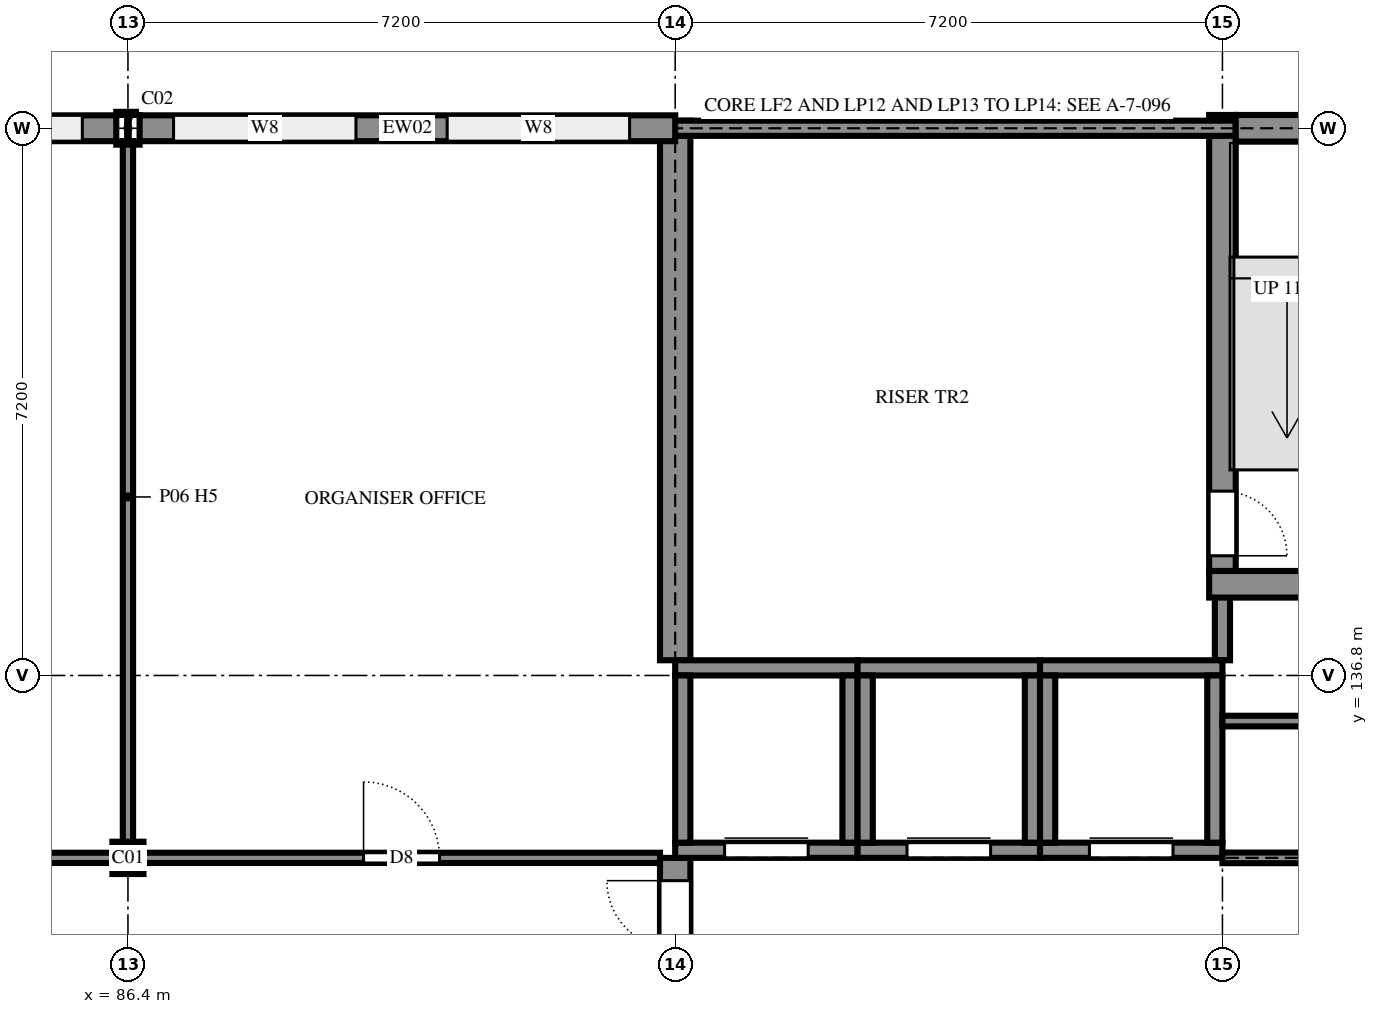
"""IFC4 building model, lengths in metres.
Left out: names, types, materials, properties, quantities, classifications, styles, units other than length and angle.
Written with IfcOpenShell. Run it as: python <this file> out.ifc"""

import sys

from ifc_helpers import new_model, si_unit, direction, frame, frame_2d, origin, origin_2d, place, context, subcontext, project, spatial, rectangle, i_section, extrude, element, fill, save


model = new_model("IFC4")
c1 = context("Model", 3, precision=1e-05, world=origin(), true_north=direction((0.0, 1.0)))
c2 = subcontext(c1, "Body", "Model", "MODEL_VIEW")
j1 = project(units=[si_unit("LENGTHUNIT", "METRE"), si_unit("PLANEANGLEUNIT", "RADIAN")], contexts=[c1])
p1 = place(None, origin())
s1 = spatial("IfcSite", under=j1, at=p1, CompositionType="ELEMENT")
p2 = place(p1, origin())
s2 = spatial("IfcBuilding", under=s1, at=p2, CompositionType="ELEMENT")
p3 = place(p2, frame((0.0, 0.0, 21.6)))
s3 = spatial("IfcBuildingStorey", under=s2, at=p3, CompositionType="ELEMENT", Elevation=21.6)
p4 = place(p3, frame((86.4, 134.4, 0.0), z_axis=(0.0, 0.0, 1.0), x_axis=(1.0, 0.0, 0.0)))
e1 = element("IfcColumn", 1, at=p4, inside=s3, PredefinedType="COLUMN", context=c2, shape_type="SweptSolid", body=[
    extrude(i_section(OverallWidth=0.409, OverallDepth=0.425, WebThickness=0.033, FlangeThickness=0.052, FilletRadius=0.015, at=origin_2d()), origin(), (0.0, 0.0, 1.0), 3.6),
])
p5 = place(p3, frame((86.4, 144.0, 0.0), z_axis=(0.0, 0.0, 1.0), x_axis=(1.0, 0.0, 0.0)))
e2 = element("IfcColumn", 2, at=p5, inside=s3, PredefinedType="COLUMN", context=c2, shape_type="SweptSolid", body=[
    extrude(i_section(OverallWidth=0.307, OverallDepth=0.432, WebThickness=0.021, FlangeThickness=0.04, FilletRadius=0.027, at=origin_2d()), origin(), (0.0, 0.0, 1.0), 3.6),
])
p6 = place(p3, frame((93.6, 132.0, 0.0), z_axis=(0.0, 0.0, 1.0), x_axis=(0.0, 1.0, 0.0)))
e3 = element("IfcWall", 3, at=p6, inside=s3, PredefinedType="SHEAR", context=c2, shape_type="SweptSolid", body=[
    extrude(rectangle(XDim=2.4, YDim=0.4, at=frame_2d((1.2, 0.0))), origin(), (0.0, 0.0, 1.0), 3.6),
])
p7 = place(p6, frame((0.3, 0.0, 0.0)))
e4 = element("IfcOpeningElement", 4, at=p7, cuts=e3, PredefinedType="OPENING", context=c2, shape_type="SweptSolid", body=[
    extrude(rectangle(XDim=1.8, YDim=2.1, at=frame_2d((0.9, 1.05))), frame((0.0, 0.21, 0.0), z_axis=(0.0, -1.0, 0.0), x_axis=(1.0, 0.0, 0.0)), (0.0, 0.0, 1.0), 0.42),
])
p8 = place(p3, frame((100.8, 137.0, 0.0), z_axis=(0.0, 0.0, 1.0), x_axis=(0.0, 1.0, 0.0)))
e5 = element("IfcWall", 5, at=p8, inside=s3, PredefinedType="SHEAR", context=c2, shape_type="SweptSolid", body=[
    extrude(rectangle(XDim=1.175, YDim=0.2, at=frame_2d((0.587, 0.0))), origin(), (0.0, 0.0, 1.0), 3.6),
])
p9 = place(p3, frame((100.625, 138.0, 0.0), z_axis=(0.0, 0.0, 1.0), x_axis=(1.0, 0.0, 0.0)))
e6 = element("IfcWall", 6, at=p9, inside=s3, PredefinedType="SHEAR", context=c2, shape_type="SweptSolid", body=[
    extrude(rectangle(XDim=3.75, YDim=0.35, at=frame_2d((1.875, 0.0))), origin(), (0.0, 0.0, 1.0), 3.6),
])
p10 = place(p9, frame((1.375, 0.0, 0.0)))
e7 = element("IfcOpeningElement", 7, at=p10, cuts=e6, PredefinedType="OPENING", context=c2, shape_type="SweptSolid", body=[
    extrude(rectangle(XDim=1.0, YDim=2.1, at=frame_2d((0.5, 1.05))), frame((0.0, 0.185, 0.0), z_axis=(0.0, -1.0, 0.0), x_axis=(1.0, 0.0, 0.0)), (0.0, 0.0, 1.0), 0.37),
])
p11 = place(p3, frame((93.6, 144.1, 0.0), z_axis=(0.0, 0.0, 1.0), x_axis=(0.0, -1.0, 0.0)))
e8 = element("IfcWall", 8, at=p11, inside=s3, PredefinedType="SHEAR", context=c2, shape_type="SweptSolid", body=[
    extrude(rectangle(XDim=7.1, YDim=0.4, at=frame_2d((3.55, 0.0))), origin(), (0.0, 0.0, 1.0), 3.6),
])
p12 = place(p3, frame((100.8, 144.175, 0.0), z_axis=(0.0, 0.0, 1.0), x_axis=(0.0, -1.0, 0.0)))
e9 = element("IfcWall", 9, at=p12, inside=s3, PredefinedType="SHEAR", context=c2, shape_type="SweptSolid", body=[
    extrude(rectangle(XDim=6.0, YDim=0.35, at=frame_2d((3.0, 0.0))), origin(), (0.0, 0.0, 1.0), 3.6),
])
p13 = place(p12, frame((4.95, 0.0, 0.0)))
e10 = element("IfcOpeningElement", 10, at=p13, cuts=e9, PredefinedType="OPENING", context=c2, shape_type="SweptSolid", body=[
    extrude(rectangle(XDim=0.85, YDim=2.1, at=frame_2d((0.425, 1.05))), frame((0.0, 0.185, 0.0), z_axis=(0.0, -1.0, 0.0), x_axis=(1.0, 0.0, 0.0)), (0.0, 0.0, 1.0), 0.37),
])
p14 = place(p3, frame((100.975, 144.0, 0.0), z_axis=(0.0, 0.0, 1.0), x_axis=(-1.0, 0.0, 0.0)))
e11 = element("IfcWall", 11, at=p14, inside=s3, PredefinedType="SHEAR", context=c2, shape_type="SweptSolid", body=[
    extrude(rectangle(XDim=7.575, YDim=0.2, at=frame_2d((3.788, 0.0))), origin(), (0.0, 0.0, 1.0), 3.6),
])
p15 = place(p3, frame((104.2, 144.0, 0.0), z_axis=(0.0, 0.0, 1.0), x_axis=(-1.0, 0.0, 0.0)))
e12 = element("IfcWall", 12, at=p15, inside=s3, PredefinedType="SHEAR", context=c2, shape_type="SweptSolid", body=[
    extrude(rectangle(XDim=3.225, YDim=0.35, at=frame_2d((1.612, 0.0))), origin(), (0.0, 0.0, 1.0), 3.6),
])
p16 = place(p15, frame((1.25, 0.0, 0.6)))
e13 = element("IfcOpeningElement", 13, at=p16, cuts=e12, PredefinedType="OPENING", context=c2, shape_type="SweptSolid", body=[
    extrude(rectangle(XDim=0.9, YDim=2.1, at=frame_2d((0.45, 1.05))), frame((0.0, 0.185, 0.0), z_axis=(0.0, -1.0, 0.0), x_axis=(1.0, 0.0, 0.0)), (0.0, 0.0, 1.0), 0.37),
])
p17 = place(p3, frame((93.6, 144.0, 0.0), z_axis=(0.0, 0.0, 1.0), x_axis=(-1.0, 0.0, 0.0)))
e14 = element("IfcWall", 14, at=p17, inside=s3, PredefinedType="SOLIDWALL", context=c2, shape_type="SweptSolid", body=[
    extrude(rectangle(XDim=7.047, YDim=0.34, at=frame_2d((3.523, 0.0))), origin(), (0.0, 0.0, 1.0), 3.16),
])
p18 = place(p17, frame((4.2, 0.0, 0.9)))
e15 = element("IfcOpeningElement", 15, at=p18, cuts=e14, PredefinedType="OPENING", context=c2, shape_type="SweptSolid", body=[
    extrude(rectangle(XDim=2.4, YDim=1.8, at=frame_2d((1.2, 0.9))), frame((0.0, 0.18, 0.0), z_axis=(0.0, -1.0, 0.0), x_axis=(1.0, 0.0, 0.0)), (0.0, 0.0, 1.0), 0.36),
])
p19 = place(p17, frame((0.6, 0.0, 0.9)))
e16 = element("IfcOpeningElement", 16, at=p19, cuts=e14, PredefinedType="OPENING", context=c2, shape_type="SweptSolid", body=[
    extrude(rectangle(XDim=2.4, YDim=1.8, at=frame_2d((1.2, 0.9))), frame((0.0, 0.18, 0.0), z_axis=(0.0, -1.0, 0.0), x_axis=(1.0, 0.0, 0.0)), (0.0, 0.0, 1.0), 0.36),
])
p20 = place(p3, frame((86.247, 144.0, 0.0), z_axis=(0.0, 0.0, 1.0), x_axis=(-1.0, 0.0, 0.0)))
e17 = element("IfcWall", 17, at=p20, inside=s3, PredefinedType="SOLIDWALL", context=c2, shape_type="SweptSolid", body=[
    extrude(rectangle(XDim=6.893, YDim=0.34, at=frame_2d((3.447, 0.0))), origin(), (0.0, 0.0, 1.0), 3.16),
])
p21 = place(p20, frame((4.046, 0.0, 0.9)))
e18 = element("IfcOpeningElement", 18, at=p21, cuts=e17, PredefinedType="OPENING", context=c2, shape_type="SweptSolid", body=[
    extrude(rectangle(XDim=2.4, YDim=1.8, at=frame_2d((1.2, 0.9))), frame((0.0, 0.18, 0.0), z_axis=(0.0, -1.0, 0.0), x_axis=(1.0, 0.0, 0.0)), (0.0, 0.0, 1.0), 0.36),
])
p22 = place(p20, frame((0.447, 0.0, 0.9)))
e19 = element("IfcOpeningElement", 19, at=p22, cuts=e17, PredefinedType="OPENING", context=c2, shape_type="SweptSolid", body=[
    extrude(rectangle(XDim=2.4, YDim=1.8, at=frame_2d((1.2, 0.9))), frame((0.0, 0.18, 0.0), z_axis=(0.0, -1.0, 0.0), x_axis=(1.0, 0.0, 0.0)), (0.0, 0.0, 1.0), 0.36),
])
p23 = place(p3, frame((93.6, 134.5, 0.0), z_axis=(0.0, 0.0, 1.0), x_axis=(1.0, 0.0, 0.0)))
e20 = element("IfcWall", 20, at=p23, inside=s3, PredefinedType="SHEAR", context=c2, shape_type="SweptSolid", body=[
    extrude(rectangle(XDim=2.4, YDim=0.2, at=frame_2d((1.2, 0.0))), origin(), (0.0, 0.0, 1.0), 3.6),
])
p24 = place(p23, frame((0.65, 0.0, 0.0)))
e21 = element("IfcOpeningElement", 21, at=p24, cuts=e20, PredefinedType="OPENING", context=c2, shape_type="SweptSolid", body=[
    extrude(rectangle(XDim=1.1, YDim=2.1, at=frame_2d((0.55, 1.05))), frame((0.0, 0.11, 0.0), z_axis=(0.0, -1.0, 0.0), x_axis=(1.0, 0.0, 0.0)), (0.0, 0.0, 1.0), 0.22),
])
p25 = place(p3, frame((93.6, 136.9, 0.0), z_axis=(0.0, 0.0, 1.0), x_axis=(1.0, 0.0, 0.0)))
e22 = element("IfcWall", 22, at=p25, inside=s3, PredefinedType="SHEAR", context=c2, shape_type="SweptSolid", body=[
    extrude(rectangle(XDim=2.4, YDim=0.2, at=frame_2d((1.2, 0.0))), origin(), (0.0, 0.0, 1.0), 3.6),
])
for number, where, z_axis, x_axis in (
    (23, (93.7, 134.6, 0.0), (0.0, 0.0, 1.0), (0.0, 1.0, 0.0)),
    (24, (95.9, 134.6, 0.0), (0.0, 0.0, 1.0), (0.0, 1.0, 0.0)),
):
    element("IfcWall", number, at=place(p3, frame(where, z_axis=z_axis, x_axis=x_axis)), inside=s3, PredefinedType="SHEAR", context=c2, shape_type="SweptSolid", body=[
        extrude(rectangle(XDim=2.2, YDim=0.2, at=frame_2d((1.1, 0.0))), origin(), (0.0, 0.0, 1.0), 3.6),
    ])
p26 = place(p3, frame((96.0, 134.5, 0.0), z_axis=(0.0, 0.0, 1.0), x_axis=(1.0, 0.0, 0.0)))
e25 = element("IfcWall", 25, at=p26, inside=s3, PredefinedType="SHEAR", context=c2, shape_type="SweptSolid", body=[
    extrude(rectangle(XDim=2.4, YDim=0.2, at=frame_2d((1.2, 0.0))), origin(), (0.0, 0.0, 1.0), 3.6),
])
p27 = place(p26, frame((0.65, 0.0, 0.0)))
e26 = element("IfcOpeningElement", 26, at=p27, cuts=e25, PredefinedType="OPENING", context=c2, shape_type="SweptSolid", body=[
    extrude(rectangle(XDim=1.1, YDim=2.1, at=frame_2d((0.55, 1.05))), frame((0.0, 0.11, 0.0), z_axis=(0.0, -1.0, 0.0), x_axis=(1.0, 0.0, 0.0)), (0.0, 0.0, 1.0), 0.22),
])
p28 = place(p3, frame((96.0, 136.9, 0.0), z_axis=(0.0, 0.0, 1.0), x_axis=(1.0, 0.0, 0.0)))
e27 = element("IfcWall", 27, at=p28, inside=s3, PredefinedType="SHEAR", context=c2, shape_type="SweptSolid", body=[
    extrude(rectangle(XDim=2.4, YDim=0.2, at=frame_2d((1.2, 0.0))), origin(), (0.0, 0.0, 1.0), 3.6),
])
for number, where, z_axis, x_axis in (
    (28, (96.1, 134.6, 0.0), (0.0, 0.0, 1.0), (0.0, 1.0, 0.0)),
    (29, (98.3, 134.6, 0.0), (0.0, 0.0, 1.0), (0.0, 1.0, 0.0)),
):
    element("IfcWall", number, at=place(p3, frame(where, z_axis=z_axis, x_axis=x_axis)), inside=s3, PredefinedType="SHEAR", context=c2, shape_type="SweptSolid", body=[
        extrude(rectangle(XDim=2.2, YDim=0.2, at=frame_2d((1.1, 0.0))), origin(), (0.0, 0.0, 1.0), 3.6),
    ])
p29 = place(p3, frame((98.4, 134.5, 0.0), z_axis=(0.0, 0.0, 1.0), x_axis=(1.0, 0.0, 0.0)))
e30 = element("IfcWall", 30, at=p29, inside=s3, PredefinedType="SHEAR", context=c2, shape_type="SweptSolid", body=[
    extrude(rectangle(XDim=2.4, YDim=0.2, at=frame_2d((1.2, 0.0))), origin(), (0.0, 0.0, 1.0), 3.6),
])
p30 = place(p29, frame((0.65, 0.0, 0.0)))
e31 = element("IfcOpeningElement", 31, at=p30, cuts=e30, PredefinedType="OPENING", context=c2, shape_type="SweptSolid", body=[
    extrude(rectangle(XDim=1.1, YDim=2.1, at=frame_2d((0.55, 1.05))), frame((0.0, 0.11, 0.0), z_axis=(0.0, -1.0, 0.0), x_axis=(1.0, 0.0, 0.0)), (0.0, 0.0, 1.0), 0.22),
])
p31 = place(p3, frame((98.4, 136.9, 0.0), z_axis=(0.0, 0.0, 1.0), x_axis=(1.0, 0.0, 0.0)))
e32 = element("IfcWall", 32, at=p31, inside=s3, PredefinedType="SHEAR", context=c2, shape_type="SweptSolid", body=[
    extrude(rectangle(XDim=2.4, YDim=0.2, at=frame_2d((1.2, 0.0))), origin(), (0.0, 0.0, 1.0), 3.6),
])
for number, where, z_axis, x_axis in (
    (33, (98.5, 134.6, 0.0), (0.0, 0.0, 1.0), (0.0, 1.0, 0.0)),
    (34, (100.7, 134.6, 0.0), (0.0, 0.0, 1.0), (0.0, 1.0, 0.0)),
):
    element("IfcWall", number, at=place(p3, frame(where, z_axis=z_axis, x_axis=x_axis)), inside=s3, PredefinedType="SHEAR", context=c2, shape_type="SweptSolid", body=[
        extrude(rectangle(XDim=2.2, YDim=0.2, at=frame_2d((1.1, 0.0))), origin(), (0.0, 0.0, 1.0), 3.6),
    ])
p32 = place(p3, frame((74.143, 134.4, 0.0), z_axis=(0.0, 0.0, 1.0), x_axis=(1.0, 0.0, 0.0)))
e35 = element("IfcWall", 35, at=p32, inside=s3, PredefinedType="PARTITIONING", context=c2, shape_type="SweptSolid", body=[
    extrude(rectangle(XDim=19.257, YDim=0.135, at=frame_2d((9.629, 0.0))), origin(), (0.0, 0.0, 1.0), 3.16),
])
p33 = place(p32, frame((2.758, 0.0, 0.0)))
e36 = element("IfcOpeningElement", 36, at=p33, cuts=e35, PredefinedType="OPENING", context=c2, shape_type="SweptSolid", body=[
    extrude(rectangle(XDim=1.0, YDim=2.4, at=frame_2d((0.5, 1.2))), frame((0.0, 0.077, 0.0), z_axis=(0.0, -1.0, 0.0), x_axis=(1.0, 0.0, 0.0)), (0.0, 0.0, 1.0), 0.155),
])
p34 = place(p32, frame((15.357, 0.0, 0.0)))
e37 = element("IfcOpeningElement", 37, at=p34, cuts=e35, PredefinedType="OPENING", context=c2, shape_type="SweptSolid", body=[
    extrude(rectangle(XDim=1.0, YDim=2.4, at=frame_2d((0.5, 1.2))), frame((0.0, 0.077, 0.0), z_axis=(0.0, -1.0, 0.0), x_axis=(1.0, 0.0, 0.0)), (0.0, 0.0, 1.0), 0.155),
])
p35 = place(p3, frame((100.8, 134.4, 0.0), z_axis=(0.0, 0.0, 1.0), x_axis=(1.0, 0.0, 0.0)))
e38 = element("IfcWall", 38, at=p35, inside=s3, PredefinedType="PARTITIONING", context=c2, shape_type="SweptSolid", body=[
    extrude(rectangle(XDim=3.3, YDim=0.14, at=frame_2d((1.65, 0.0))), origin(), (0.0, 0.0, 1.0), 3.46),
])
p36 = place(p35, frame((1.2, 0.0, 0.0)))
e39 = element("IfcOpeningElement", 39, at=p36, cuts=e38, PredefinedType="OPENING", context=c2, shape_type="SweptSolid", body=[
    extrude(rectangle(XDim=1.0, YDim=2.1, at=frame_2d((0.5, 1.05))), frame((0.0, 0.08, 0.0), z_axis=(0.0, -1.0, 0.0), x_axis=(1.0, 0.0, 0.0)), (0.0, 0.0, 1.0), 0.16),
])
p37 = place(p3, frame((100.8, 136.2, 0.0), z_axis=(0.0, 0.0, 1.0), x_axis=(1.0, 0.0, 0.0)))
e40 = element("IfcWall", 40, at=p37, inside=s3, PredefinedType="PARTITIONING", context=c2, shape_type="SweptSolid", body=[
    extrude(rectangle(XDim=3.3, YDim=0.14, at=frame_2d((1.65, 0.0))), origin(), (0.0, 0.0, 1.0), 3.46),
])
p38 = place(p37, frame((1.2, 0.0, 0.0)))
e41 = element("IfcOpeningElement", 41, at=p38, cuts=e40, PredefinedType="OPENING", context=c2, shape_type="SweptSolid", body=[
    extrude(rectangle(XDim=1.0, YDim=2.1, at=frame_2d((0.5, 1.05))), frame((0.0, 0.08, 0.0), z_axis=(0.0, -1.0, 0.0), x_axis=(1.0, 0.0, 0.0)), (0.0, 0.0, 1.0), 0.16),
])
p39 = place(p3, frame((86.4, 134.468, 0.0), z_axis=(0.0, 0.0, 1.0), x_axis=(0.0, 1.0, 0.0)))
e42 = element("IfcWall", 42, at=p39, inside=s3, PredefinedType="PARTITIONING", context=c2, shape_type="SweptSolid", body=[
    extrude(rectangle(XDim=9.363, YDim=0.135, at=frame_2d((4.681, 0.0))), origin(), (0.0, 0.0, 1.0), 3.06),
])
p40 = place(p18, origin())
e43 = element("IfcWindow", 43, at=p40, inside=s3, PartitioningType="SINGLE_PANEL", PredefinedType="WINDOW", context=c2, shape_type="SweptSolid", body=[
    extrude(rectangle(XDim=2.4, YDim=1.8, at=frame_2d((1.2, 0.9))), frame((0.0, 0.03, 0.0), z_axis=(0.0, -1.0, 0.0), x_axis=(1.0, 0.0, 0.0)), (0.0, 0.0, 1.0), 0.06),
])
fill(e15, e43)
p41 = place(p19, origin())
e44 = element("IfcWindow", 44, at=p41, inside=s3, PartitioningType="SINGLE_PANEL", PredefinedType="WINDOW", context=c2, shape_type="SweptSolid", body=[
    extrude(rectangle(XDim=2.4, YDim=1.8, at=frame_2d((1.2, 0.9))), frame((0.0, 0.03, 0.0), z_axis=(0.0, -1.0, 0.0), x_axis=(1.0, 0.0, 0.0)), (0.0, 0.0, 1.0), 0.06),
])
fill(e16, e44)
p42 = place(p22, origin())
e45 = element("IfcWindow", 45, at=p42, inside=s3, PartitioningType="SINGLE_PANEL", PredefinedType="WINDOW", context=c2, shape_type="SweptSolid", body=[
    extrude(rectangle(XDim=2.4, YDim=1.8, at=frame_2d((1.2, 0.9))), frame((0.0, 0.03, 0.0), z_axis=(0.0, -1.0, 0.0), x_axis=(1.0, 0.0, 0.0)), (0.0, 0.0, 1.0), 0.06),
])
fill(e19, e45)
p43 = place(p24, origin())
e46 = element("IfcDoor", 46, at=p43, inside=s3, OperationType="SLIDING_TO_LEFT", PredefinedType="DOOR", context=c2, shape_type="SweptSolid", body=[
    extrude(rectangle(XDim=1.1, YDim=2.1, at=frame_2d((0.55, 1.05))), frame((0.0, 0.025, 0.0), z_axis=(0.0, -1.0, 0.0), x_axis=(1.0, 0.0, 0.0)), (0.0, 0.0, 1.0), 0.05),
])
fill(e21, e46)
p44 = place(p27, origin())
e47 = element("IfcDoor", 47, at=p44, inside=s3, OperationType="SLIDING_TO_LEFT", PredefinedType="DOOR", context=c2, shape_type="SweptSolid", body=[
    extrude(rectangle(XDim=1.1, YDim=2.1, at=frame_2d((0.55, 1.05))), frame((0.0, 0.025, 0.0), z_axis=(0.0, -1.0, 0.0), x_axis=(1.0, 0.0, 0.0)), (0.0, 0.0, 1.0), 0.05),
])
fill(e26, e47)
p45 = place(p30, origin())
e48 = element("IfcDoor", 48, at=p45, inside=s3, OperationType="SLIDING_TO_LEFT", PredefinedType="DOOR", context=c2, shape_type="SweptSolid", body=[
    extrude(rectangle(XDim=1.1, YDim=2.1, at=frame_2d((0.55, 1.05))), frame((0.0, 0.025, 0.0), z_axis=(0.0, -1.0, 0.0), x_axis=(1.0, 0.0, 0.0)), (0.0, 0.0, 1.0), 0.05),
])
fill(e31, e48)
p46 = place(p34, origin())
e49 = element("IfcDoor", 49, at=p46, inside=s3, OperationType="SINGLE_SWING_RIGHT", PredefinedType="DOOR", context=c2, shape_type="SweptSolid", body=[
    extrude(rectangle(XDim=1.0, YDim=2.4, at=frame_2d((0.5, 1.2))), frame((0.0, 0.025, 0.0), z_axis=(0.0, -1.0, 0.0), x_axis=(1.0, 0.0, 0.0)), (0.0, 0.0, 1.0), 0.05),
])
fill(e37, e49)
p47 = place(p13, origin())
e50 = element("IfcDoor", 50, at=p47, inside=s3, OperationType="SINGLE_SWING_LEFT", PredefinedType="DOOR", context=c2, shape_type="SweptSolid", body=[
    extrude(rectangle(XDim=0.85, YDim=2.1, at=frame_2d((0.425, 1.05))), frame((0.0, 0.025, 0.0), z_axis=(0.0, -1.0, 0.0), x_axis=(1.0, 0.0, 0.0)), (0.0, 0.0, 1.0), 0.05),
])
fill(e10, e50)
p48 = place(p7, origin())
e51 = element("IfcDoor", 51, at=p48, inside=s3, OperationType="DOUBLE_DOOR_SINGLE_SWING", PredefinedType="DOOR", context=c2, shape_type="SweptSolid", body=[
    extrude(rectangle(XDim=1.8, YDim=2.1, at=frame_2d((0.9, 1.05))), frame((0.0, 0.025, 0.0), z_axis=(0.0, -1.0, 0.0), x_axis=(1.0, 0.0, 0.0)), (0.0, 0.0, 1.0), 0.05),
])
fill(e4, e51)
save(model, sys.argv[1])
